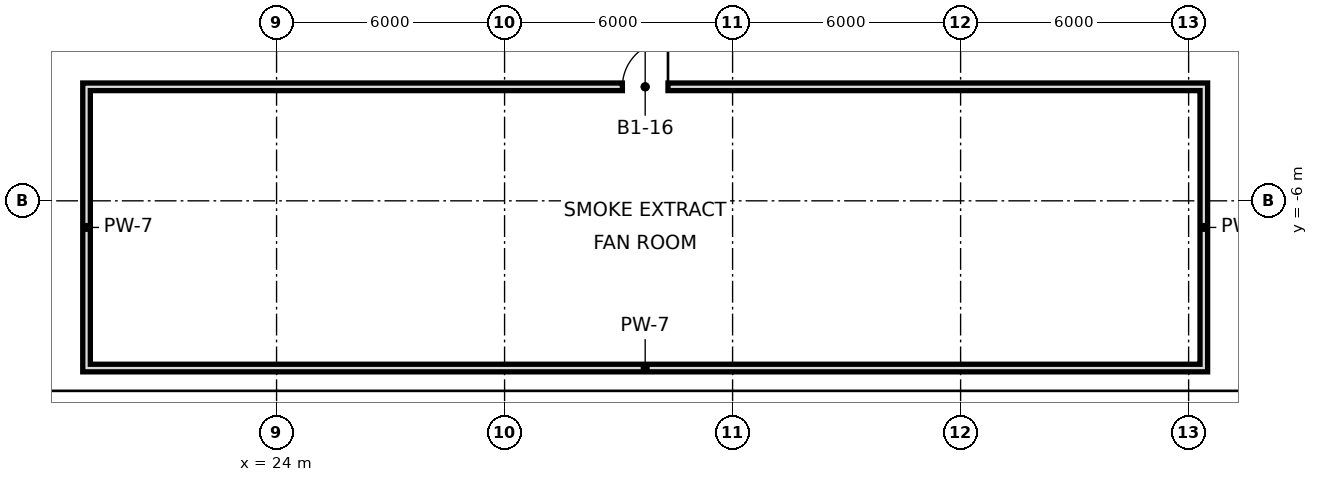
"""IFC4 building model, lengths in metres.
Left out: names, types, materials, properties, quantities, classifications, styles, units other than length and angle.
Written with IfcOpenShell. Run it as: python <this file> out.ifc"""

import sys

from ifc_helpers import new_model, si_unit, direction, frame, frame_2d, origin, place, context, subcontext, project, spatial, rectangle, extrude, element, fill, save


model = new_model("IFC4")
c1 = context("Model", 3, precision=1e-05, world=origin(), true_north=direction((0.0, 1.0)))
c2 = subcontext(c1, "Body", "Model", "MODEL_VIEW")
j1 = project(units=[si_unit("LENGTHUNIT", "METRE"), si_unit("PLANEANGLEUNIT", "RADIAN")], contexts=[c1])
p1 = place(None, origin())
s1 = spatial("IfcSite", under=j1, at=p1, CompositionType="ELEMENT")
p2 = place(p1, origin())
s2 = spatial("IfcBuilding", under=s1, at=p2, CompositionType="ELEMENT")
p3 = place(p2, frame((0.0, 0.0, -13.5)))
s3 = spatial("IfcBuildingStorey", under=s2, at=p3, CompositionType="ELEMENT", Elevation=-13.5)
p4 = place(p3, frame((-23.0, -11.5, -26.5), z_axis=(0.0, 0.0, 1.0), x_axis=(1.0, 0.0, 0.0)))
e1 = element("IfcWall", 1, at=p4, inside=s3, PredefinedType="SOLIDWALL", context=c2, shape_type="SweptSolid", body=[
    extrude(rectangle(XDim=112.0, YDim=1.0, at=frame_2d((56.0, 0.0))), origin(), (0.0, 0.0, 1.0), 39.64),
])
p5 = place(p2, frame((0.0, 0.0, -4.5)))
s4 = spatial("IfcBuildingStorey", under=s2, at=p5, CompositionType="ELEMENT", Elevation=-4.5)
for number, where, z_axis, x_axis in (
    (2, (19.0, -10.5, 0.0), (0.0, 0.0, 1.0), (0.0, 1.0, 0.0)),
    (3, (48.4, -10.5, 0.0), (0.0, 0.0, 1.0), (0.0, 1.0, 0.0)),
):
    element("IfcWall", number, at=place(p5, frame(where, z_axis=z_axis, x_axis=x_axis)), inside=s4, PredefinedType="SOLIDWALL", context=c2, shape_type="SweptSolid", body=[
        extrude(rectangle(XDim=7.6, YDim=0.2, at=frame_2d((3.8, 0.0))), origin(), (0.0, 0.0, 1.0), 4.14),
    ])
p6 = place(p5, frame((19.1, -10.4, 0.0), z_axis=(0.0, 0.0, 1.0), x_axis=(1.0, 0.0, 0.0)))
e4 = element("IfcWall", 4, at=p6, inside=s4, PredefinedType="SOLIDWALL", context=c2, shape_type="SweptSolid", body=[
    extrude(rectangle(XDim=29.2, YDim=0.2, at=frame_2d((14.6, 0.0))), origin(), (0.0, 0.0, 1.0), 4.14),
])
p7 = place(p5, frame((19.1, -3.0, 0.0), z_axis=(0.0, 0.0, 1.0), x_axis=(1.0, 0.0, 0.0)))
e5 = element("IfcWall", 5, at=p7, inside=s4, PredefinedType="SOLIDWALL", context=c2, shape_type="SweptSolid", body=[
    extrude(rectangle(XDim=29.2, YDim=0.2, at=frame_2d((14.6, 0.0))), origin(), (0.0, 0.0, 1.0), 4.14),
])
p8 = place(p7, frame((14.0, 0.0, 0.0)))
e6 = element("IfcOpeningElement", 6, at=p8, cuts=e5, PredefinedType="OPENING", context=c2, shape_type="SweptSolid", body=[
    extrude(rectangle(XDim=1.2, YDim=2.4, at=frame_2d((0.6, 1.2))), frame((0.0, 0.11, 0.0), z_axis=(0.0, -1.0, 0.0), x_axis=(1.0, 0.0, 0.0)), (0.0, 0.0, 1.0), 0.22),
])
p9 = place(p8, frame((1.2, 0.0, 0.0), z_axis=(0.0, 0.0, 1.0), x_axis=(-1.0, 0.0, 0.0)))
e7 = element("IfcDoor", 7, at=p9, inside=s4, OperationType="SINGLE_SWING_LEFT", PredefinedType="DOOR", context=c2, shape_type="SweptSolid", body=[
    extrude(rectangle(XDim=1.2, YDim=2.4, at=frame_2d((0.6, 1.2))), frame((0.0, 0.025, 0.0), z_axis=(0.0, -1.0, 0.0), x_axis=(1.0, 0.0, 0.0)), (0.0, 0.0, 1.0), 0.05),
])
fill(e6, e7)
save(model, sys.argv[1])
